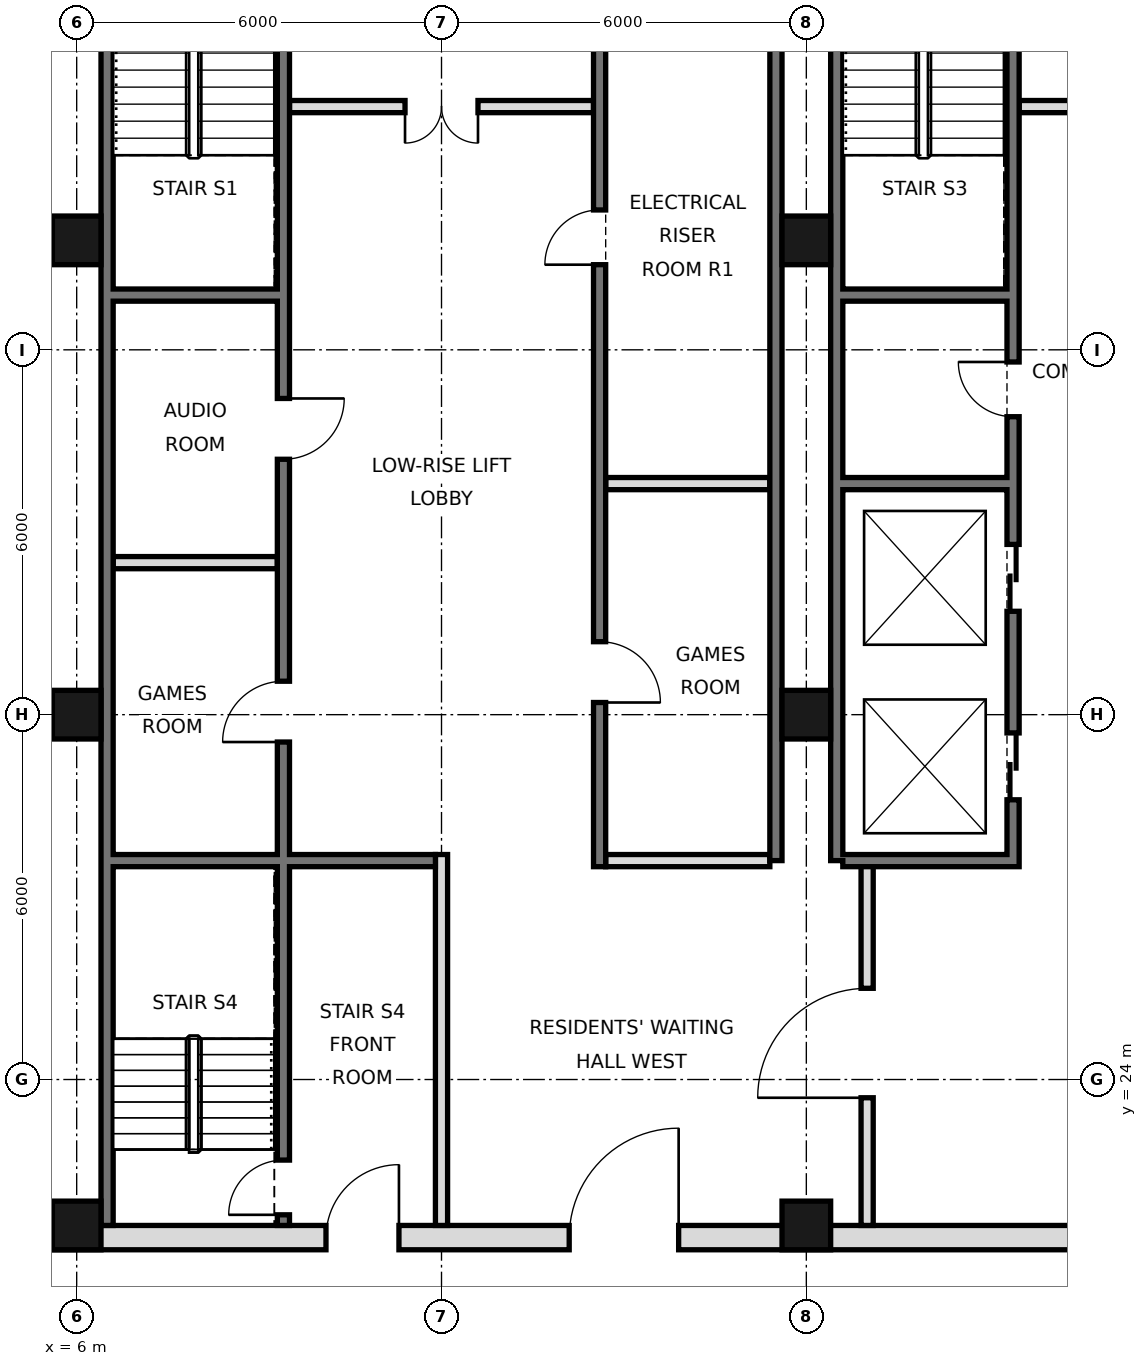
"""IFC4 building model, lengths in metres.
Left out: names, types, materials, properties, quantities, classifications, styles, units other than length and angle.
Written with IfcOpenShell. Run it as: python <this file> out.ifc"""

import sys

from ifc_helpers import new_model, si_unit, direction, frame, frame_2d, origin, origin_2d, place, context, subcontext, project, spatial, rectangle, hollow_rectangle, extrude, element, fill, save


model = new_model("IFC4")
c1 = context("Model", 3, precision=1e-05, world=origin(), true_north=direction((0.0, 1.0)))
c2 = subcontext(c1, "Body", "Model", "MODEL_VIEW")
j1 = project(units=[si_unit("LENGTHUNIT", "METRE"), si_unit("PLANEANGLEUNIT", "RADIAN")], contexts=[c1])
p1 = place(None, origin())
s1 = spatial("IfcSite", under=j1, at=p1, CompositionType="ELEMENT")
p2 = place(p1, origin())
s2 = spatial("IfcBuilding", under=s1, at=p2, CompositionType="ELEMENT")
p3 = place(p2, frame((0.0, 0.0, 210.0)))
s3 = spatial("IfcBuildingStorey", under=s2, at=p3, CompositionType="ELEMENT", Elevation=210.0)
for number, where, z_axis, x_axis in (
    (1, (6.0, 21.6, 0.0), (0.0, 0.0, 1.0), (1.0, 0.0, 0.0)),
    (2, (6.0, 30.0, 0.0), (0.0, 0.0, 1.0), (1.0, 0.0, 0.0)),
    (3, (6.0, 37.8, 0.0), (0.0, 0.0, 1.0), (1.0, 0.0, 0.0)),
    (4, (18.0, 21.6, 0.0), (0.0, 0.0, 1.0), (1.0, 0.0, 0.0)),
    (5, (18.0, 30.0, 0.0), (0.0, 0.0, 1.0), (1.0, 0.0, 0.0)),
    (6, (18.0, 37.8, 0.0), (0.0, 0.0, 1.0), (1.0, 0.0, 0.0)),
):
    element("IfcColumn", number, at=place(p3, frame(where, z_axis=z_axis, x_axis=x_axis)), inside=s3, PredefinedType="COLUMN", context=c2, shape_type="SweptSolid", body=[
        extrude(hollow_rectangle(XDim=0.8, YDim=0.8, WallThickness=0.04, at=origin_2d()), origin(), (0.0, 0.0, 1.0), 5.4),
    ])
p4 = place(p3, frame((6.5, 21.6, 0.0), z_axis=(0.0, 0.0, 1.0), x_axis=(0.0, 1.0, 0.0)))
e7 = element("IfcWall", 7, at=p4, inside=s3, PredefinedType="SOLIDWALL", context=c2, shape_type="SweptSolid", body=[
    extrude(rectangle(XDim=23.5, YDim=0.2, at=frame_2d((11.75, 0.0))), origin(), (0.0, 0.0, 1.0), 5.22),
])
for number, where, z_axis, x_axis in (
    (8, (17.5, 27.6, 0.0), (0.0, 0.0, 1.0), (0.0, 1.0, 0.0)),
    (9, (18.5, 27.6, 0.0), (0.0, 0.0, 1.0), (0.0, 1.0, 0.0)),
):
    element("IfcWall", number, at=place(p3, frame(where, z_axis=z_axis, x_axis=x_axis)), inside=s3, PredefinedType="SOLIDWALL", context=c2, shape_type="SweptSolid", body=[
        extrude(rectangle(XDim=17.5, YDim=0.2, at=frame_2d((8.75, 0.0))), origin(), (0.0, 0.0, 1.0), 5.22),
    ])
p5 = place(p3, frame((5.6, 21.4, 0.0), z_axis=(0.0, 0.0, 1.0), x_axis=(1.0, 0.0, 0.0)))
e10 = element("IfcWall", 10, at=p5, inside=s3, PredefinedType="SOLIDWALL", context=c2, shape_type="SweptSolid", body=[
    extrude(rectangle(XDim=36.8, YDim=0.4, at=frame_2d((18.4, 0.0))), origin(), (0.0, 0.0, 1.0), 5.22),
])
p6 = place(p5, frame((8.5, 0.0, 0.0)))
e11 = element("IfcOpeningElement", 11, at=p6, cuts=e10, PredefinedType="OPENING", context=c2, shape_type="SweptSolid", body=[
    extrude(rectangle(XDim=1.8, YDim=2.1, at=frame_2d((0.9, 1.05))), frame((0.0, 0.21, 0.0), z_axis=(0.0, -1.0, 0.0), x_axis=(1.0, 0.0, 0.0)), (0.0, 0.0, 1.0), 0.42),
])
p7 = place(p5, frame((17.5, 0.0, 0.0)))
e12 = element("IfcOpeningElement", 12, at=p7, cuts=e10, PredefinedType="OPENING", context=c2, shape_type="SweptSolid", body=[
    extrude(rectangle(XDim=1.8, YDim=2.1, at=frame_2d((0.9, 1.05))), frame((0.0, 0.21, 0.0), z_axis=(0.0, -1.0, 0.0), x_axis=(1.0, 0.0, 0.0)), (0.0, 0.0, 1.0), 0.42),
])
p8 = place(p5, frame((26.5, 0.0, 0.0)))
e13 = element("IfcOpeningElement", 13, at=p8, cuts=e10, PredefinedType="OPENING", context=c2, shape_type="SweptSolid", body=[
    extrude(rectangle(XDim=1.8, YDim=2.1, at=frame_2d((0.9, 1.05))), frame((0.0, 0.21, 0.0), z_axis=(0.0, -1.0, 0.0), x_axis=(1.0, 0.0, 0.0)), (0.0, 0.0, 1.0), 0.42),
])
p9 = place(p5, frame((4.5, 0.0, 0.0)))
e14 = element("IfcOpeningElement", 14, at=p9, cuts=e10, PredefinedType="OPENING", context=c2, shape_type="SweptSolid", body=[
    extrude(rectangle(XDim=1.2, YDim=2.1, at=frame_2d((0.6, 1.05))), frame((0.0, 0.21, 0.0), z_axis=(0.0, -1.0, 0.0), x_axis=(1.0, 0.0, 0.0)), (0.0, 0.0, 1.0), 0.42),
])
p10 = place(p5, frame((31.1, 0.0, 0.0)))
e15 = element("IfcOpeningElement", 15, at=p10, cuts=e10, PredefinedType="OPENING", context=c2, shape_type="SweptSolid", body=[
    extrude(rectangle(XDim=1.2, YDim=2.1, at=frame_2d((0.6, 1.05))), frame((0.0, 0.21, 0.0), z_axis=(0.0, -1.0, 0.0), x_axis=(1.0, 0.0, 0.0)), (0.0, 0.0, 1.0), 0.42),
])
p11 = place(p3, frame((19.0, 21.6, 0.0), z_axis=(0.0, 0.0, 1.0), x_axis=(0.0, 1.0, 0.0)))
e16 = element("IfcWall", 16, at=p11, inside=s3, PredefinedType="PARTITIONING", context=c2, shape_type="SweptSolid", body=[
    extrude(rectangle(XDim=6.0, YDim=0.2, at=frame_2d((3.0, 0.0))), origin(), (0.0, 0.0, 1.0), 5.22),
])
p12 = place(p11, frame((2.1, 0.0, 0.0)))
e17 = element("IfcOpeningElement", 17, at=p12, cuts=e16, PredefinedType="OPENING", context=c2, shape_type="SweptSolid", body=[
    extrude(rectangle(XDim=1.8, YDim=2.1, at=frame_2d((0.9, 1.05))), frame((0.0, 0.11, 0.0), z_axis=(0.0, -1.0, 0.0), x_axis=(1.0, 0.0, 0.0)), (0.0, 0.0, 1.0), 0.22),
])
p13 = place(p3, frame((12.0, 21.6, 0.0), z_axis=(0.0, 0.0, 1.0), x_axis=(0.0, 1.0, 0.0)))
e18 = element("IfcWall", 18, at=p13, inside=s3, PredefinedType="PARTITIONING", context=c2, shape_type="SweptSolid", body=[
    extrude(rectangle(XDim=6.1, YDim=0.2, at=frame_2d((3.05, 0.0))), origin(), (0.0, 0.0, 1.0), 5.22),
])
p14 = place(p3, frame((14.6, 27.5, 0.0), z_axis=(0.0, 0.0, 1.0), x_axis=(0.0, 1.0, 0.0)))
e19 = element("IfcWall", 19, at=p14, inside=s3, PredefinedType="SOLIDWALL", context=c2, shape_type="SweptSolid", body=[
    extrude(rectangle(XDim=17.5, YDim=0.2, at=frame_2d((8.75, 0.0))), origin(), (0.0, 0.0, 1.0), 5.22),
])
p15 = place(p14, frame((15.4, 0.0, 0.0)))
e20 = element("IfcOpeningElement", 20, at=p15, cuts=e19, PredefinedType="OPENING", context=c2, shape_type="SweptSolid", body=[
    extrude(rectangle(XDim=1.1, YDim=2.1, at=frame_2d((0.55, 1.05))), frame((0.0, 0.11, 0.0), z_axis=(0.0, -1.0, 0.0), x_axis=(1.0, 0.0, 0.0)), (0.0, 0.0, 1.0), 0.22),
])
p16 = place(p14, frame((2.7, 0.0, 0.0)))
e21 = element("IfcOpeningElement", 21, at=p16, cuts=e19, PredefinedType="OPENING", context=c2, shape_type="SweptSolid", body=[
    extrude(rectangle(XDim=1.0, YDim=2.1, at=frame_2d((0.5, 1.05))), frame((0.0, 0.11, 0.0), z_axis=(0.0, -1.0, 0.0), x_axis=(1.0, 0.0, 0.0)), (0.0, 0.0, 1.0), 0.22),
])
p17 = place(p14, frame((9.9, 0.0, 0.0)))
e22 = element("IfcOpeningElement", 22, at=p17, cuts=e19, PredefinedType="OPENING", context=c2, shape_type="SweptSolid", body=[
    extrude(rectangle(XDim=0.9, YDim=2.1, at=frame_2d((0.45, 1.05))), frame((0.0, 0.11, 0.0), z_axis=(0.0, -1.0, 0.0), x_axis=(1.0, 0.0, 0.0)), (0.0, 0.0, 1.0), 0.22),
])
p18 = place(p3, frame((21.4, 27.5, 0.0), z_axis=(0.0, 0.0, 1.0), x_axis=(0.0, 1.0, 0.0)))
e23 = element("IfcWall", 23, at=p18, inside=s3, PredefinedType="SOLIDWALL", context=c2, shape_type="SweptSolid", body=[
    extrude(rectangle(XDim=17.5, YDim=0.2, at=frame_2d((8.75, 0.0))), origin(), (0.0, 0.0, 1.0), 5.22),
])
p19 = place(p18, frame((1.1, 0.0, 0.0)))
e24 = element("IfcOpeningElement", 24, at=p19, cuts=e23, PredefinedType="OPENING", context=c2, shape_type="SweptSolid", body=[
    extrude(rectangle(XDim=1.1, YDim=2.1, at=frame_2d((0.55, 1.05))), frame((0.0, 0.11, 0.0), z_axis=(0.0, -1.0, 0.0), x_axis=(1.0, 0.0, 0.0)), (0.0, 0.0, 1.0), 0.22),
])
p20 = place(p18, frame((4.2, 0.0, 0.0)))
e25 = element("IfcOpeningElement", 25, at=p20, cuts=e23, PredefinedType="OPENING", context=c2, shape_type="SweptSolid", body=[
    extrude(rectangle(XDim=1.1, YDim=2.1, at=frame_2d((0.55, 1.05))), frame((0.0, 0.11, 0.0), z_axis=(0.0, -1.0, 0.0), x_axis=(1.0, 0.0, 0.0)), (0.0, 0.0, 1.0), 0.22),
])
p21 = place(p18, frame((16.2, 0.0, 0.0)))
e26 = element("IfcOpeningElement", 26, at=p21, cuts=e23, PredefinedType="OPENING", context=c2, shape_type="SweptSolid", body=[
    extrude(rectangle(XDim=1.0, YDim=2.1, at=frame_2d((0.5, 1.05))), frame((0.0, 0.11, 0.0), z_axis=(0.0, -1.0, 0.0), x_axis=(1.0, 0.0, 0.0)), (0.0, 0.0, 1.0), 0.22),
])
p22 = place(p18, frame((7.4, 0.0, 0.0)))
e27 = element("IfcOpeningElement", 27, at=p22, cuts=e23, PredefinedType="OPENING", context=c2, shape_type="SweptSolid", body=[
    extrude(rectangle(XDim=0.9, YDim=2.1, at=frame_2d((0.45, 1.05))), frame((0.0, 0.11, 0.0), z_axis=(0.0, -1.0, 0.0), x_axis=(1.0, 0.0, 0.0)), (0.0, 0.0, 1.0), 0.22),
])
p23 = place(p3, frame((9.4, 21.6, 0.0), z_axis=(0.0, 0.0, 1.0), x_axis=(0.0, 1.0, 0.0)))
e28 = element("IfcWall", 28, at=p23, inside=s3, PredefinedType="SOLIDWALL", context=c2, shape_type="SweptSolid", body=[
    extrude(rectangle(XDim=23.4, YDim=0.2, at=frame_2d((11.7, 0.0))), origin(), (0.0, 0.0, 1.0), 5.22),
])
p24 = place(p23, frame((7.95, 0.0, 0.0)))
e29 = element("IfcOpeningElement", 29, at=p24, cuts=e28, PredefinedType="OPENING", context=c2, shape_type="SweptSolid", body=[
    extrude(rectangle(XDim=1.0, YDim=2.1, at=frame_2d((0.5, 1.05))), frame((0.0, 0.11, 0.0), z_axis=(0.0, -1.0, 0.0), x_axis=(1.0, 0.0, 0.0)), (0.0, 0.0, 1.0), 0.22),
])
p25 = place(p23, frame((12.6, 0.0, 0.0)))
e30 = element("IfcOpeningElement", 30, at=p25, cuts=e28, PredefinedType="OPENING", context=c2, shape_type="SweptSolid", body=[
    extrude(rectangle(XDim=1.0, YDim=2.1, at=frame_2d((0.5, 1.05))), frame((0.0, 0.11, 0.0), z_axis=(0.0, -1.0, 0.0), x_axis=(1.0, 0.0, 0.0)), (0.0, 0.0, 1.0), 0.22),
])
p26 = place(p23, frame((22.1, 0.0, 0.0)))
e31 = element("IfcOpeningElement", 31, at=p26, cuts=e28, PredefinedType="OPENING", context=c2, shape_type="SweptSolid", body=[
    extrude(rectangle(XDim=1.0, YDim=2.1, at=frame_2d((0.5, 1.05))), frame((0.0, 0.11, 0.0), z_axis=(0.0, -1.0, 0.0), x_axis=(1.0, 0.0, 0.0)), (0.0, 0.0, 1.0), 0.22),
])
p27 = place(p23, frame((0.175, 0.0, 0.0)))
e32 = element("IfcOpeningElement", 32, at=p27, cuts=e28, PredefinedType="OPENING", context=c2, shape_type="SweptSolid", body=[
    extrude(rectangle(XDim=0.9, YDim=2.1, at=frame_2d((0.45, 1.05))), frame((0.0, 0.11, 0.0), z_axis=(0.0, -1.0, 0.0), x_axis=(1.0, 0.0, 0.0)), (0.0, 0.0, 1.0), 0.22),
])
p28 = place(p3, frame((14.7, 27.6, 0.0), z_axis=(0.0, 0.0, 1.0), x_axis=(1.0, 0.0, 0.0)))
e33 = element("IfcWall", 33, at=p28, inside=s3, PredefinedType="PARTITIONING", context=c2, shape_type="SweptSolid", body=[
    extrude(rectangle(XDim=2.7, YDim=0.2, at=frame_2d((1.35, 0.0))), origin(), (0.0, 0.0, 1.0), 5.22),
])
p29 = place(p3, frame((18.6, 27.6, 0.0), z_axis=(0.0, 0.0, 1.0), x_axis=(1.0, 0.0, 0.0)))
e34 = element("IfcWall", 34, at=p29, inside=s3, PredefinedType="SOLIDWALL", context=c2, shape_type="SweptSolid", body=[
    extrude(rectangle(XDim=2.7, YDim=0.2, at=frame_2d((1.35, 0.0))), origin(), (0.0, 0.0, 1.0), 5.22),
])
p30 = place(p3, frame((6.6, 27.6, 0.0), z_axis=(0.0, 0.0, 1.0), x_axis=(1.0, 0.0, 0.0)))
e35 = element("IfcWall", 35, at=p30, inside=s3, PredefinedType="SOLIDWALL", context=c2, shape_type="SweptSolid", body=[
    extrude(rectangle(XDim=5.3, YDim=0.2, at=frame_2d((2.65, 0.0))), origin(), (0.0, 0.0, 1.0), 5.22),
])
p31 = place(p3, frame((6.6, 32.5, 0.0), z_axis=(0.0, 0.0, 1.0), x_axis=(1.0, 0.0, 0.0)))
e36 = element("IfcWall", 36, at=p31, inside=s3, PredefinedType="PARTITIONING", context=c2, shape_type="SweptSolid", body=[
    extrude(rectangle(XDim=2.7, YDim=0.2, at=frame_2d((1.35, 0.0))), origin(), (0.0, 0.0, 1.0), 5.22),
])
for number, where, z_axis, x_axis in (
    (37, (14.7, 33.8, 0.0), (0.0, 0.0, 1.0), (1.0, 0.0, 0.0)),
    (38, (18.6, 33.8, 0.0), (0.0, 0.0, 1.0), (1.0, 0.0, 0.0)),
    (39, (18.6, 36.9, 0.0), (0.0, 0.0, 1.0), (1.0, 0.0, 0.0)),
    (40, (6.6, 36.9, 0.0), (0.0, 0.0, 1.0), (1.0, 0.0, 0.0)),
):
    element("IfcWall", number, at=place(p3, frame(where, z_axis=z_axis, x_axis=x_axis)), inside=s3, PredefinedType="SOLIDWALL", context=c2, shape_type="SweptSolid", body=[
        extrude(rectangle(XDim=2.7, YDim=0.2, at=frame_2d((1.35, 0.0))), origin(), (0.0, 0.0, 1.0), 5.22),
    ])
p32 = place(p3, frame((21.5, 40.0, 0.0), z_axis=(0.0, 0.0, 1.0), x_axis=(1.0, 0.0, 0.0)))
e41 = element("IfcWall", 41, at=p32, inside=s3, PredefinedType="PARTITIONING", context=c2, shape_type="SweptSolid", body=[
    extrude(rectangle(XDim=5.0, YDim=0.2, at=frame_2d((2.5, 0.0))), origin(), (0.0, 0.0, 1.0), 5.22),
])
p33 = place(p32, frame((1.9, 0.0, 0.0)))
e42 = element("IfcOpeningElement", 42, at=p33, cuts=e41, PredefinedType="OPENING", context=c2, shape_type="SweptSolid", body=[
    extrude(rectangle(XDim=1.2, YDim=2.1, at=frame_2d((0.6, 1.05))), frame((0.0, 0.11, 0.0), z_axis=(0.0, -1.0, 0.0), x_axis=(1.0, 0.0, 0.0)), (0.0, 0.0, 1.0), 0.22),
])
p34 = place(p3, frame((9.5, 40.0, 0.0), z_axis=(0.0, 0.0, 1.0), x_axis=(1.0, 0.0, 0.0)))
e43 = element("IfcWall", 43, at=p34, inside=s3, PredefinedType="PARTITIONING", context=c2, shape_type="SweptSolid", body=[
    extrude(rectangle(XDim=5.0, YDim=0.2, at=frame_2d((2.5, 0.0))), origin(), (0.0, 0.0, 1.0), 5.22),
])
p35 = place(p34, frame((1.9, 0.0, 0.0)))
e44 = element("IfcOpeningElement", 44, at=p35, cuts=e43, PredefinedType="OPENING", context=c2, shape_type="SweptSolid", body=[
    extrude(rectangle(XDim=1.2, YDim=2.1, at=frame_2d((0.6, 1.05))), frame((0.0, 0.11, 0.0), z_axis=(0.0, -1.0, 0.0), x_axis=(1.0, 0.0, 0.0)), (0.0, 0.0, 1.0), 0.22),
])
p36 = place(p6, frame((1.8, 0.0, 0.0), z_axis=(0.0, 0.0, 1.0), x_axis=(-1.0, 0.0, 0.0)))
e45 = element("IfcDoor", 45, at=p36, inside=s3, OperationType="SINGLE_SWING_LEFT", PredefinedType="DOOR", context=c2, shape_type="SweptSolid", body=[
    extrude(rectangle(XDim=1.8, YDim=2.1, at=frame_2d((0.9, 1.05))), frame((0.0, 0.025, 0.0), z_axis=(0.0, -1.0, 0.0), x_axis=(1.0, 0.0, 0.0)), (0.0, 0.0, 1.0), 0.05),
])
fill(e11, e45)
p37 = place(p12, origin())
e46 = element("IfcDoor", 46, at=p37, inside=s3, OperationType="SINGLE_SWING_LEFT", PredefinedType="DOOR", context=c2, shape_type="SweptSolid", body=[
    extrude(rectangle(XDim=1.8, YDim=2.1, at=frame_2d((0.9, 1.05))), frame((0.0, 0.025, 0.0), z_axis=(0.0, -1.0, 0.0), x_axis=(1.0, 0.0, 0.0)), (0.0, 0.0, 1.0), 0.05),
])
fill(e17, e46)
p38 = place(p9, frame((1.2, 0.0, 0.0), z_axis=(0.0, 0.0, 1.0), x_axis=(-1.0, 0.0, 0.0)))
e47 = element("IfcDoor", 47, at=p38, inside=s3, OperationType="SINGLE_SWING_LEFT", PredefinedType="DOOR", context=c2, shape_type="SweptSolid", body=[
    extrude(rectangle(XDim=1.2, YDim=2.1, at=frame_2d((0.6, 1.05))), frame((0.0, 0.025, 0.0), z_axis=(0.0, -1.0, 0.0), x_axis=(1.0, 0.0, 0.0)), (0.0, 0.0, 1.0), 0.05),
])
fill(e14, e47)
p39 = place(p35, frame((1.2, 0.0, 0.0), z_axis=(0.0, 0.0, 1.0), x_axis=(-1.0, 0.0, 0.0)))
e48 = element("IfcDoor", 48, at=p39, inside=s3, OperationType="DOUBLE_DOOR_SINGLE_SWING", PredefinedType="DOOR", context=c2, shape_type="SweptSolid", body=[
    extrude(rectangle(XDim=1.2, YDim=2.1, at=frame_2d((0.6, 1.05))), frame((0.0, 0.025, 0.0), z_axis=(0.0, -1.0, 0.0), x_axis=(1.0, 0.0, 0.0)), (0.0, 0.0, 1.0), 0.05),
])
fill(e44, e48)
p40 = place(p19, origin())
e49 = element("IfcDoor", 49, at=p40, inside=s3, OperationType="DOUBLE_DOOR_SLIDING", PredefinedType="DOOR", context=c2, shape_type="SweptSolid", body=[
    extrude(rectangle(XDim=1.1, YDim=2.1, at=frame_2d((0.55, 1.05))), frame((0.0, 0.025, 0.0), z_axis=(0.0, -1.0, 0.0), x_axis=(1.0, 0.0, 0.0)), (0.0, 0.0, 1.0), 0.05),
])
fill(e24, e49)
p41 = place(p20, origin())
e50 = element("IfcDoor", 50, at=p41, inside=s3, OperationType="DOUBLE_DOOR_SLIDING", PredefinedType="DOOR", context=c2, shape_type="SweptSolid", body=[
    extrude(rectangle(XDim=1.1, YDim=2.1, at=frame_2d((0.55, 1.05))), frame((0.0, 0.025, 0.0), z_axis=(0.0, -1.0, 0.0), x_axis=(1.0, 0.0, 0.0)), (0.0, 0.0, 1.0), 0.05),
])
fill(e25, e50)
p42 = place(p16, frame((1.0, 0.0, 0.0), z_axis=(0.0, 0.0, 1.0), x_axis=(-1.0, 0.0, 0.0)))
e51 = element("IfcDoor", 51, at=p42, inside=s3, OperationType="SINGLE_SWING_RIGHT", PredefinedType="DOOR", context=c2, shape_type="SweptSolid", body=[
    extrude(rectangle(XDim=1.0, YDim=2.1, at=frame_2d((0.5, 1.05))), frame((0.0, 0.025, 0.0), z_axis=(0.0, -1.0, 0.0), x_axis=(1.0, 0.0, 0.0)), (0.0, 0.0, 1.0), 0.05),
])
fill(e21, e51)
p43 = place(p24, origin())
e52 = element("IfcDoor", 52, at=p43, inside=s3, OperationType="SINGLE_SWING_LEFT", PredefinedType="DOOR", context=c2, shape_type="SweptSolid", body=[
    extrude(rectangle(XDim=1.0, YDim=2.1, at=frame_2d((0.5, 1.05))), frame((0.0, 0.025, 0.0), z_axis=(0.0, -1.0, 0.0), x_axis=(1.0, 0.0, 0.0)), (0.0, 0.0, 1.0), 0.05),
])
fill(e29, e52)
p44 = place(p25, origin())
e53 = element("IfcDoor", 53, at=p44, inside=s3, OperationType="SINGLE_SWING_RIGHT", PredefinedType="DOOR", context=c2, shape_type="SweptSolid", body=[
    extrude(rectangle(XDim=1.0, YDim=2.1, at=frame_2d((0.5, 1.05))), frame((0.0, 0.025, 0.0), z_axis=(0.0, -1.0, 0.0), x_axis=(1.0, 0.0, 0.0)), (0.0, 0.0, 1.0), 0.05),
])
fill(e30, e53)
p45 = place(p27, origin())
e54 = element("IfcDoor", 54, at=p45, inside=s3, OperationType="SINGLE_SWING_LEFT", PredefinedType="DOOR", context=c2, shape_type="SweptSolid", body=[
    extrude(rectangle(XDim=0.9, YDim=2.1, at=frame_2d((0.45, 1.05))), frame((0.0, 0.025, 0.0), z_axis=(0.0, -1.0, 0.0), x_axis=(1.0, 0.0, 0.0)), (0.0, 0.0, 1.0), 0.05),
])
fill(e32, e54)
p46 = place(p17, origin())
e55 = element("IfcDoor", 55, at=p46, inside=s3, OperationType="SINGLE_SWING_LEFT", PredefinedType="DOOR", context=c2, shape_type="SweptSolid", body=[
    extrude(rectangle(XDim=0.9, YDim=2.1, at=frame_2d((0.45, 1.05))), frame((0.0, 0.025, 0.0), z_axis=(0.0, -1.0, 0.0), x_axis=(1.0, 0.0, 0.0)), (0.0, 0.0, 1.0), 0.05),
])
fill(e22, e55)
p47 = place(p22, frame((0.9, 0.0, 0.0), z_axis=(0.0, 0.0, 1.0), x_axis=(-1.0, 0.0, 0.0)))
e56 = element("IfcDoor", 56, at=p47, inside=s3, OperationType="SINGLE_SWING_LEFT", PredefinedType="DOOR", context=c2, shape_type="SweptSolid", body=[
    extrude(rectangle(XDim=0.9, YDim=2.1, at=frame_2d((0.45, 1.05))), frame((0.0, 0.025, 0.0), z_axis=(0.0, -1.0, 0.0), x_axis=(1.0, 0.0, 0.0)), (0.0, 0.0, 1.0), 0.05),
])
fill(e27, e56)
save(model, sys.argv[1])
